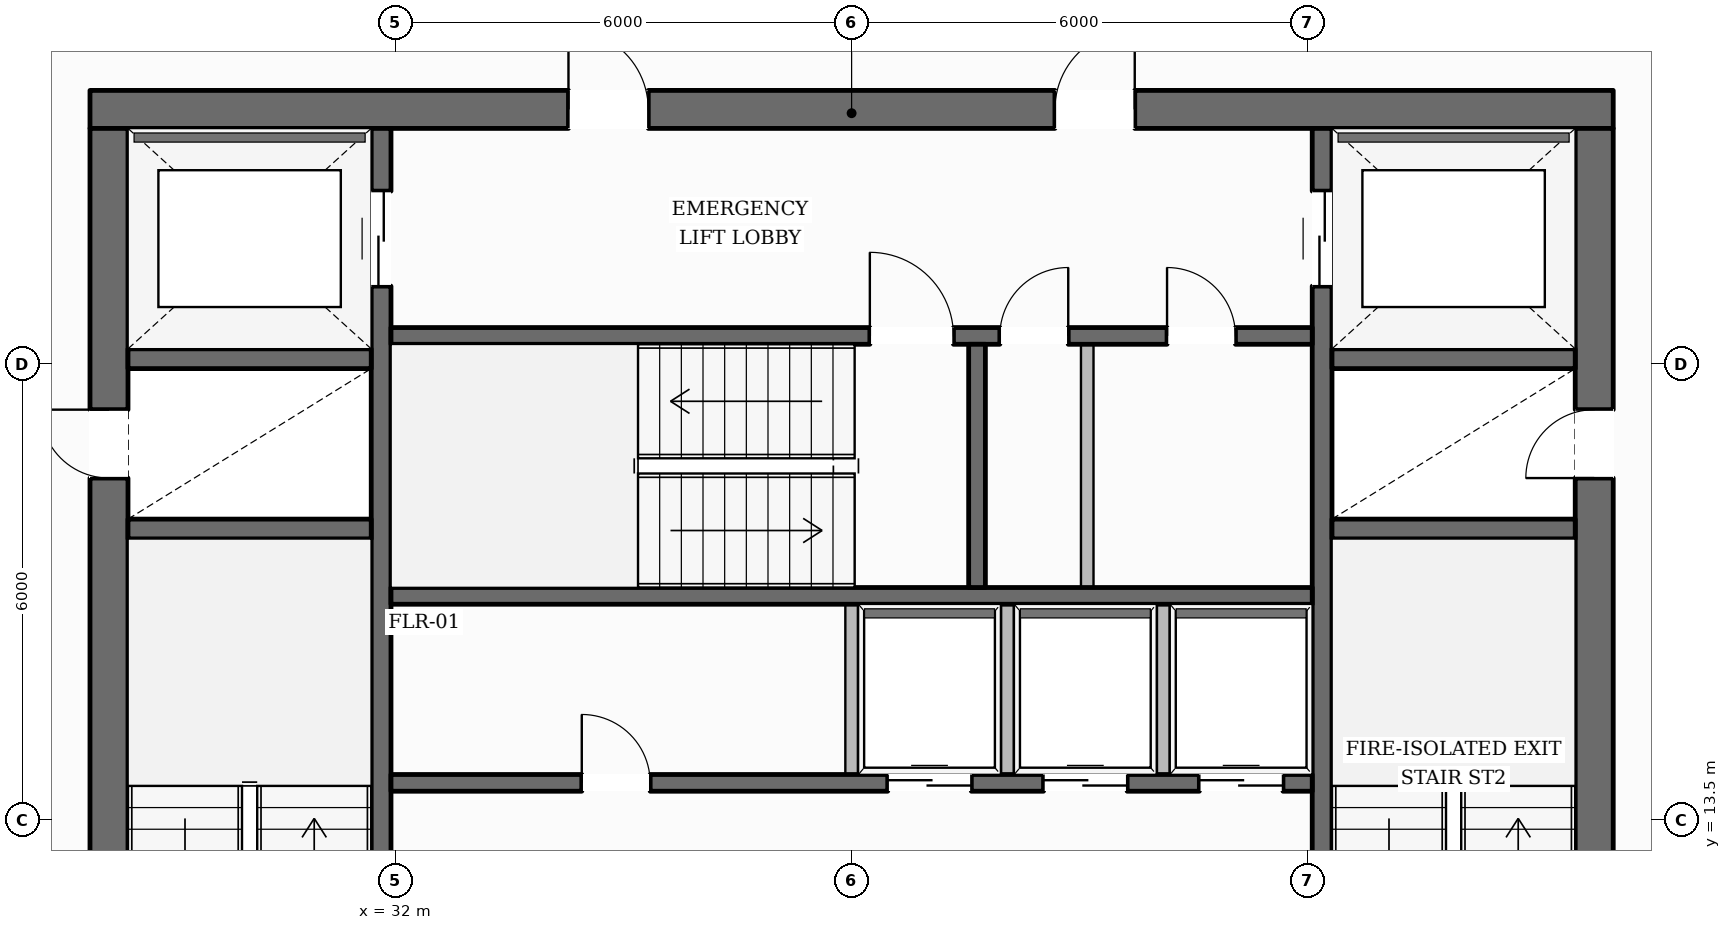
"""IFC4 building model, lengths in metres.
Left out: names, types, materials, properties, quantities, classifications, styles, units other than length and angle.
Written with IfcOpenShell. Run it as: python <this file> out.ifc"""

import sys

from ifc_helpers import new_model, si_unit, direction, frame, frame_2d, origin, place, context, subcontext, project, spatial, rectangle, extrude, element, fill, save


model = new_model("IFC4")
c1 = context("Model", 3, precision=1e-05, world=origin(), true_north=direction((0.0, 1.0)))
c2 = subcontext(c1, "Body", "Model", "MODEL_VIEW")
j1 = project(units=[si_unit("LENGTHUNIT", "METRE"), si_unit("PLANEANGLEUNIT", "RADIAN")], contexts=[c1])
p1 = place(None, origin())
s1 = spatial("IfcSite", under=j1, at=p1, CompositionType="ELEMENT")
p2 = place(p1, origin())
s2 = spatial("IfcBuilding", under=s1, at=p2, CompositionType="ELEMENT")
p3 = place(p2, frame((0.0, 0.0, 89.35)))
s3 = spatial("IfcBuildingStorey", under=s2, at=p3, CompositionType="ELEMENT", Elevation=89.35)
p4 = place(p3, frame((27.98, 22.85, 0.0), z_axis=(0.0, 0.0, 1.0), x_axis=(1.0, 0.0, 0.0)))
e1 = element("IfcWall", 1, at=p4, inside=s3, PredefinedType="SOLIDWALL", context=c2, shape_type="SweptSolid", body=[
    extrude(rectangle(XDim=20.04, YDim=0.5, at=frame_2d((10.02, 0.0))), origin(), (0.0, 0.0, 1.0), 3.6),
])
p5 = place(p4, frame((6.295, 0.0, 0.0)))
e2 = element("IfcOpeningElement", 2, at=p5, cuts=e1, PredefinedType="OPENING", context=c2, shape_type="SweptSolid", body=[
    extrude(rectangle(XDim=1.05, YDim=2.15, at=frame_2d((0.525, 1.075))), frame((0.0, 0.26, 0.0), z_axis=(0.0, -1.0, 0.0), x_axis=(1.0, 0.0, 0.0)), (0.0, 0.0, 1.0), 0.52),
])
p6 = place(p4, frame((12.695, 0.0, 0.0)))
e3 = element("IfcOpeningElement", 3, at=p6, cuts=e1, PredefinedType="OPENING", context=c2, shape_type="SweptSolid", body=[
    extrude(rectangle(XDim=1.05, YDim=2.15, at=frame_2d((0.525, 1.075))), frame((0.0, 0.26, 0.0), z_axis=(0.0, -1.0, 0.0), x_axis=(1.0, 0.0, 0.0)), (0.0, 0.0, 1.0), 0.52),
])
p7 = place(p3, frame((28.23, 9.6, 0.0), z_axis=(0.0, 0.0, 1.0), x_axis=(0.0, 1.0, 0.0)))
e4 = element("IfcWall", 4, at=p7, inside=s3, PredefinedType="SOLIDWALL", context=c2, shape_type="SweptSolid", body=[
    extrude(rectangle(XDim=13.0, YDim=0.5, at=frame_2d((6.5, 0.0))), origin(), (0.0, 0.0, 1.0), 3.6),
])
p8 = place(p7, frame((0.2, 0.0, 0.0)))
e5 = element("IfcOpeningElement", 5, at=p8, cuts=e4, PredefinedType="OPENING", context=c2, shape_type="SweptSolid", body=[
    extrude(rectangle(XDim=1.1, YDim=2.15, at=frame_2d((0.55, 1.075))), frame((0.0, 0.26, 0.0), z_axis=(0.0, -1.0, 0.0), x_axis=(1.0, 0.0, 0.0)), (0.0, 0.0, 1.0), 0.52),
])
p9 = place(p7, frame((8.4, 0.0, 0.0)))
e6 = element("IfcOpeningElement", 6, at=p9, cuts=e4, PredefinedType="OPENING", context=c2, shape_type="SweptSolid", body=[
    extrude(rectangle(XDim=0.9, YDim=2.1, at=frame_2d((0.45, 1.05))), frame((0.0, 0.26, 0.0), z_axis=(0.0, -1.0, 0.0), x_axis=(1.0, 0.0, 0.0)), (0.0, 0.0, 1.0), 0.52),
])
p10 = place(p3, frame((47.77, 9.6, 0.0), z_axis=(0.0, 0.0, 1.0), x_axis=(0.0, 1.0, 0.0)))
e7 = element("IfcWall", 7, at=p10, inside=s3, PredefinedType="SOLIDWALL", context=c2, shape_type="SweptSolid", body=[
    extrude(rectangle(XDim=13.0, YDim=0.5, at=frame_2d((6.5, 0.0))), origin(), (0.0, 0.0, 1.0), 3.6),
])
p11 = place(p10, frame((0.2, 0.0, 0.0)))
e8 = element("IfcOpeningElement", 8, at=p11, cuts=e7, PredefinedType="OPENING", context=c2, shape_type="SweptSolid", body=[
    extrude(rectangle(XDim=1.1, YDim=2.15, at=frame_2d((0.55, 1.075))), frame((0.0, 0.26, 0.0), z_axis=(0.0, -1.0, 0.0), x_axis=(1.0, 0.0, 0.0)), (0.0, 0.0, 1.0), 0.52),
])
p12 = place(p10, frame((8.4, 0.0, 0.0)))
e9 = element("IfcOpeningElement", 9, at=p12, cuts=e7, PredefinedType="OPENING", context=c2, shape_type="SweptSolid", body=[
    extrude(rectangle(XDim=0.9, YDim=2.1, at=frame_2d((0.45, 1.05))), frame((0.0, 0.26, 0.0), z_axis=(0.0, -1.0, 0.0), x_axis=(1.0, 0.0, 0.0)), (0.0, 0.0, 1.0), 0.52),
])
p13 = place(p3, frame((31.81, 9.6, 0.0), z_axis=(0.0, 0.0, 1.0), x_axis=(0.0, 1.0, 0.0)))
e10 = element("IfcWall", 10, at=p13, inside=s3, PredefinedType="SHEAR", context=c2, shape_type="SweptSolid", body=[
    extrude(rectangle(XDim=13.0, YDim=0.26, at=frame_2d((6.5, 0.0))), origin(), (0.0, 0.0, 1.0), 3.6),
])
p14 = place(p13, frame((10.925, 0.0, 0.0)))
e11 = element("IfcOpeningElement", 11, at=p14, cuts=e10, PredefinedType="OPENING", context=c2, shape_type="SweptSolid", body=[
    extrude(rectangle(XDim=1.25, YDim=2.25, at=frame_2d((0.625, 1.125))), frame((0.0, 0.14, 0.0), z_axis=(0.0, -1.0, 0.0), x_axis=(1.0, 0.0, 0.0)), (0.0, 0.0, 1.0), 0.28),
])
p15 = place(p3, frame((44.19, 9.6, 0.0), z_axis=(0.0, 0.0, 1.0), x_axis=(0.0, 1.0, 0.0)))
e12 = element("IfcWall", 12, at=p15, inside=s3, PredefinedType="SHEAR", context=c2, shape_type="SweptSolid", body=[
    extrude(rectangle(XDim=13.0, YDim=0.26, at=frame_2d((6.5, 0.0))), origin(), (0.0, 0.0, 1.0), 3.6),
])
p16 = place(p15, frame((10.925, 0.0, 0.0)))
e13 = element("IfcOpeningElement", 13, at=p16, cuts=e12, PredefinedType="OPENING", context=c2, shape_type="SweptSolid", body=[
    extrude(rectangle(XDim=1.25, YDim=2.25, at=frame_2d((0.625, 1.125))), frame((0.0, 0.14, 0.0), z_axis=(0.0, -1.0, 0.0), x_axis=(1.0, 0.0, 0.0)), (0.0, 0.0, 1.0), 0.28),
])
for number, where, z_axis, x_axis in (
    (14, (28.48, 17.33, 0.0), (0.0, 0.0, 1.0), (1.0, 0.0, 0.0)),
    (15, (28.48, 19.57, 0.0), (0.0, 0.0, 1.0), (1.0, 0.0, 0.0)),
    (16, (44.32, 17.33, 0.0), (0.0, 0.0, 1.0), (1.0, 0.0, 0.0)),
    (17, (44.32, 19.57, 0.0), (0.0, 0.0, 1.0), (1.0, 0.0, 0.0)),
):
    element("IfcWall", number, at=place(p3, frame(where, z_axis=z_axis, x_axis=x_axis)), inside=s3, PredefinedType="SHEAR", context=c2, shape_type="SweptSolid", body=[
        extrude(rectangle(XDim=3.2, YDim=0.26, at=frame_2d((1.6, 0.0))), origin(), (0.0, 0.0, 1.0), 3.6),
    ])
p17 = place(p3, frame((31.94, 19.87, 0.0), z_axis=(0.0, 0.0, 1.0), x_axis=(1.0, 0.0, 0.0)))
e18 = element("IfcWall", 18, at=p17, inside=s3, PredefinedType="SOLIDWALL", context=c2, shape_type="SweptSolid", body=[
    extrude(rectangle(XDim=12.12, YDim=0.22, at=frame_2d((6.06, 0.0))), origin(), (0.0, 0.0, 1.0), 3.6),
])
p18 = place(p17, frame((6.3, 0.0, 0.0)))
e19 = element("IfcOpeningElement", 19, at=p18, cuts=e18, PredefinedType="OPENING", context=c2, shape_type="SweptSolid", body=[
    extrude(rectangle(XDim=1.1, YDim=2.15, at=frame_2d((0.55, 1.075))), frame((0.0, 0.12, 0.0), z_axis=(0.0, -1.0, 0.0), x_axis=(1.0, 0.0, 0.0)), (0.0, 0.0, 1.0), 0.24),
])
p19 = place(p17, frame((8.01, 0.0, 0.0)))
e20 = element("IfcOpeningElement", 20, at=p19, cuts=e18, PredefinedType="OPENING", context=c2, shape_type="SweptSolid", body=[
    extrude(rectangle(XDim=0.9, YDim=2.1, at=frame_2d((0.45, 1.05))), frame((0.0, 0.12, 0.0), z_axis=(0.0, -1.0, 0.0), x_axis=(1.0, 0.0, 0.0)), (0.0, 0.0, 1.0), 0.24),
])
p20 = place(p17, frame((10.21, 0.0, 0.0)))
e21 = element("IfcOpeningElement", 21, at=p20, cuts=e18, PredefinedType="OPENING", context=c2, shape_type="SweptSolid", body=[
    extrude(rectangle(XDim=0.9, YDim=2.1, at=frame_2d((0.45, 1.05))), frame((0.0, 0.12, 0.0), z_axis=(0.0, -1.0, 0.0), x_axis=(1.0, 0.0, 0.0)), (0.0, 0.0, 1.0), 0.24),
])
p21 = place(p3, frame((31.94, 16.45, 0.0), z_axis=(0.0, 0.0, 1.0), x_axis=(1.0, 0.0, 0.0)))
e22 = element("IfcWall", 22, at=p21, inside=s3, PredefinedType="SOLIDWALL", context=c2, shape_type="SweptSolid", body=[
    extrude(rectangle(XDim=12.12, YDim=0.22, at=frame_2d((6.06, 0.0))), origin(), (0.0, 0.0, 1.0), 3.6),
])
p22 = place(p3, frame((39.65, 16.56, 0.0), z_axis=(0.0, 0.0, 1.0), x_axis=(0.0, 1.0, 0.0)))
e23 = element("IfcWall", 23, at=p22, inside=s3, PredefinedType="SOLIDWALL", context=c2, shape_type="SweptSolid", body=[
    extrude(rectangle(XDim=3.2, YDim=0.22, at=frame_2d((1.6, 0.0))), origin(), (0.0, 0.0, 1.0), 3.6),
])
p23 = place(p3, frame((31.94, 13.99, 0.0), z_axis=(0.0, 0.0, 1.0), x_axis=(1.0, 0.0, 0.0)))
e24 = element("IfcWall", 24, at=p23, inside=s3, PredefinedType="SOLIDWALL", context=c2, shape_type="SweptSolid", body=[
    extrude(rectangle(XDim=12.12, YDim=0.22, at=frame_2d((6.06, 0.0))), origin(), (0.0, 0.0, 1.0), 3.6),
])
p24 = place(p23, frame((2.51, 0.0, 0.0)))
e25 = element("IfcOpeningElement", 25, at=p24, cuts=e24, PredefinedType="OPENING", context=c2, shape_type="SweptSolid", body=[
    extrude(rectangle(XDim=0.9, YDim=2.1, at=frame_2d((0.45, 1.05))), frame((0.0, 0.12, 0.0), z_axis=(0.0, -1.0, 0.0), x_axis=(1.0, 0.0, 0.0)), (0.0, 0.0, 1.0), 0.24),
])
p25 = place(p23, frame((6.535, 0.0, 0.0)))
e26 = element("IfcOpeningElement", 26, at=p25, cuts=e24, PredefinedType="OPENING", context=c2, shape_type="SweptSolid", body=[
    extrude(rectangle(XDim=1.1, YDim=2.2, at=frame_2d((0.55, 1.1))), frame((0.0, 0.12, 0.0), z_axis=(0.0, -1.0, 0.0), x_axis=(1.0, 0.0, 0.0)), (0.0, 0.0, 1.0), 0.24),
])
p26 = place(p23, frame((8.585, 0.0, 0.0)))
e27 = element("IfcOpeningElement", 27, at=p26, cuts=e24, PredefinedType="OPENING", context=c2, shape_type="SweptSolid", body=[
    extrude(rectangle(XDim=1.1, YDim=2.2, at=frame_2d((0.55, 1.1))), frame((0.0, 0.12, 0.0), z_axis=(0.0, -1.0, 0.0), x_axis=(1.0, 0.0, 0.0)), (0.0, 0.0, 1.0), 0.24),
])
p27 = place(p23, frame((10.635, 0.0, 0.0)))
e28 = element("IfcOpeningElement", 28, at=p27, cuts=e24, PredefinedType="OPENING", context=c2, shape_type="SweptSolid", body=[
    extrude(rectangle(XDim=1.1, YDim=2.2, at=frame_2d((0.55, 1.1))), frame((0.0, 0.12, 0.0), z_axis=(0.0, -1.0, 0.0), x_axis=(1.0, 0.0, 0.0)), (0.0, 0.0, 1.0), 0.24),
])
p28 = place(p3, frame((13.926, 13.506, 0.0), z_axis=(0.0, 0.0, 1.0), x_axis=(0.496286611319, 0.868158740914, 0.0)))
e29 = element("IfcWall", 29, at=p28, inside=s3, PredefinedType="STANDARD", context=c2, shape_type="SweptSolid", body=[
    extrude(rectangle(XDim=35.785, YDim=0.38, at=frame_2d((17.893, 0.0))), origin(), (0.0, 0.0, 1.0), 3.059),
])
p29 = place(p28, frame((31.63, 0.0, 0.65)))
e30 = element("IfcOpeningElement", 30, at=p29, cuts=e29, PredefinedType="OPENING", context=c2, shape_type="SweptSolid", body=[
    extrude(rectangle(XDim=1.55, YDim=1.75, at=frame_2d((0.775, 0.875))), frame((0.0, 0.2, 0.0), z_axis=(0.0, -1.0, 0.0), x_axis=(1.0, 0.0, 0.0)), (0.0, 0.0, 1.0), 0.4),
])
p30 = place(p28, frame((25.824, 0.0, 0.65)))
e31 = element("IfcOpeningElement", 31, at=p30, cuts=e29, PredefinedType="OPENING", context=c2, shape_type="SweptSolid", body=[
    extrude(rectangle(XDim=1.55, YDim=1.75, at=frame_2d((0.775, 0.875))), frame((0.0, 0.2, 0.0), z_axis=(0.0, -1.0, 0.0), x_axis=(1.0, 0.0, 0.0)), (0.0, 0.0, 1.0), 0.4),
])
p31 = place(p28, frame((20.018, 0.0, 0.65)))
e32 = element("IfcOpeningElement", 32, at=p31, cuts=e29, PredefinedType="OPENING", context=c2, shape_type="SweptSolid", body=[
    extrude(rectangle(XDim=1.55, YDim=1.75, at=frame_2d((0.775, 0.875))), frame((0.0, 0.2, 0.0), z_axis=(0.0, -1.0, 0.0), x_axis=(1.0, 0.0, 0.0)), (0.0, 0.0, 1.0), 0.4),
])
p32 = place(p28, frame((8.407, 0.0, 0.65)))
e33 = element("IfcOpeningElement", 33, at=p32, cuts=e29, PredefinedType="OPENING", context=c2, shape_type="SweptSolid", body=[
    extrude(rectangle(XDim=1.55, YDim=1.75, at=frame_2d((0.775, 0.875))), frame((0.0, 0.2, 0.0), z_axis=(0.0, -1.0, 0.0), x_axis=(1.0, 0.0, 0.0)), (0.0, 0.0, 1.0), 0.4),
])
p33 = place(p28, frame((2.601, 0.0, 0.65)))
e34 = element("IfcOpeningElement", 34, at=p33, cuts=e29, PredefinedType="OPENING", context=c2, shape_type="SweptSolid", body=[
    extrude(rectangle(XDim=1.55, YDim=1.75, at=frame_2d((0.775, 0.875))), frame((0.0, 0.2, 0.0), z_axis=(0.0, -1.0, 0.0), x_axis=(1.0, 0.0, 0.0)), (0.0, 0.0, 1.0), 0.4),
])
p34 = place(p3, frame((44.253, 44.609, 0.0), z_axis=(0.0, 0.0, 1.0), x_axis=(0.493917790196, -0.869508606356, 0.0)))
e35 = element("IfcWall", 35, at=p34, inside=s3, PredefinedType="STANDARD", context=c2, shape_type="SweptSolid", body=[
    extrude(rectangle(XDim=35.62, YDim=0.38, at=frame_2d((17.81, 0.0))), origin(), (0.0, 0.0, 1.0), 3.059),
])
p35 = place(p34, frame((8.505, 0.0, 0.0)))
e36 = element("IfcOpeningElement", 36, at=p35, cuts=e35, PredefinedType="OPENING", context=c2, shape_type="SweptSolid", body=[
    extrude(rectangle(XDim=1.0, YDim=2.2, at=frame_2d((0.5, 1.1))), frame((0.0, 0.2, 0.0), z_axis=(0.0, -1.0, 0.0), x_axis=(1.0, 0.0, 0.0)), (0.0, 0.0, 1.0), 0.4),
])
p36 = place(p34, frame((31.483, 0.0, 0.65)))
e37 = element("IfcOpeningElement", 37, at=p36, cuts=e35, PredefinedType="OPENING", context=c2, shape_type="SweptSolid", body=[
    extrude(rectangle(XDim=1.55, YDim=1.75, at=frame_2d((0.775, 0.875))), frame((0.0, 0.2, 0.0), z_axis=(0.0, -1.0, 0.0), x_axis=(1.0, 0.0, 0.0)), (0.0, 0.0, 1.0), 0.4),
])
p37 = place(p34, frame((25.705, 0.0, 0.65)))
e38 = element("IfcOpeningElement", 38, at=p37, cuts=e35, PredefinedType="OPENING", context=c2, shape_type="SweptSolid", body=[
    extrude(rectangle(XDim=1.55, YDim=1.75, at=frame_2d((0.775, 0.875))), frame((0.0, 0.2, 0.0), z_axis=(0.0, -1.0, 0.0), x_axis=(1.0, 0.0, 0.0)), (0.0, 0.0, 1.0), 0.4),
])
p38 = place(p34, frame((19.927, 0.0, 0.65)))
e39 = element("IfcOpeningElement", 39, at=p38, cuts=e35, PredefinedType="OPENING", context=c2, shape_type="SweptSolid", body=[
    extrude(rectangle(XDim=1.55, YDim=1.75, at=frame_2d((0.775, 0.875))), frame((0.0, 0.2, 0.0), z_axis=(0.0, -1.0, 0.0), x_axis=(1.0, 0.0, 0.0)), (0.0, 0.0, 1.0), 0.4),
])
p39 = place(p34, frame((2.594, 0.0, 0.65)))
e40 = element("IfcOpeningElement", 40, at=p39, cuts=e35, PredefinedType="OPENING", context=c2, shape_type="SweptSolid", body=[
    extrude(rectangle(XDim=1.55, YDim=1.75, at=frame_2d((0.775, 0.875))), frame((0.0, 0.2, 0.0), z_axis=(0.0, -1.0, 0.0), x_axis=(1.0, 0.0, 0.0)), (0.0, 0.0, 1.0), 0.4),
])
for number, where, z_axis, x_axis in (
    (41, (38.0, 14.1, 0.0), (0.0, 0.0, 1.0), (0.0, 1.0, 0.0)),
    (42, (40.05, 14.1, 0.0), (0.0, 0.0, 1.0), (0.0, 1.0, 0.0)),
    (43, (42.1, 14.1, 0.0), (0.0, 0.0, 1.0), (0.0, 1.0, 0.0)),
):
    element("IfcWall", number, at=place(p3, frame(where, z_axis=z_axis, x_axis=x_axis)), inside=s3, PredefinedType="PARTITIONING", context=c2, shape_type="SweptSolid", body=[
        extrude(rectangle(XDim=2.24, YDim=0.165, at=frame_2d((1.12, 0.0))), origin(), (0.0, 0.0, 1.0), 3.6),
    ])
p40 = place(p3, frame((41.1, 16.56, 0.0), z_axis=(0.0, 0.0, 1.0), x_axis=(0.0, 1.0, 0.0)))
e44 = element("IfcWall", 44, at=p40, inside=s3, PredefinedType="PARTITIONING", context=c2, shape_type="SweptSolid", body=[
    extrude(rectangle(XDim=3.2, YDim=0.165, at=frame_2d((1.6, 0.0))), origin(), (0.0, 0.0, 1.0), 3.6),
])
p41 = place(p18, origin())
e45 = element("IfcDoor", 45, at=p41, inside=s3, OperationType="SINGLE_SWING_LEFT", PredefinedType="DOOR", context=c2, shape_type="SweptSolid", body=[
    extrude(rectangle(XDim=1.1, YDim=2.15, at=frame_2d((0.55, 1.075))), frame((0.0, 0.025, 0.0), z_axis=(0.0, -1.0, 0.0), x_axis=(1.0, 0.0, 0.0)), (0.0, 0.0, 1.0), 0.05),
])
fill(e19, e45)
p42 = place(p9, origin())
e46 = element("IfcDoor", 46, at=p42, inside=s3, OperationType="SINGLE_SWING_RIGHT", PredefinedType="DOOR", context=c2, shape_type="SweptSolid", body=[
    extrude(rectangle(XDim=0.9, YDim=2.1, at=frame_2d((0.45, 1.05))), frame((0.0, 0.025, 0.0), z_axis=(0.0, -1.0, 0.0), x_axis=(1.0, 0.0, 0.0)), (0.0, 0.0, 1.0), 0.05),
])
fill(e6, e46)
p43 = place(p12, origin())
e47 = element("IfcDoor", 47, at=p43, inside=s3, OperationType="SINGLE_SWING_LEFT", PredefinedType="DOOR", context=c2, shape_type="SweptSolid", body=[
    extrude(rectangle(XDim=0.9, YDim=2.1, at=frame_2d((0.45, 1.05))), frame((0.0, 0.025, 0.0), z_axis=(0.0, -1.0, 0.0), x_axis=(1.0, 0.0, 0.0)), (0.0, 0.0, 1.0), 0.05),
])
fill(e9, e47)
p44 = place(p5, origin())
e48 = element("IfcDoor", 48, at=p44, inside=s3, OperationType="SINGLE_SWING_LEFT", PredefinedType="DOOR", context=c2, shape_type="SweptSolid", body=[
    extrude(rectangle(XDim=1.05, YDim=2.15, at=frame_2d((0.525, 1.075))), frame((0.0, 0.025, 0.0), z_axis=(0.0, -1.0, 0.0), x_axis=(1.0, 0.0, 0.0)), (0.0, 0.0, 1.0), 0.05),
])
fill(e2, e48)
p45 = place(p6, origin())
e49 = element("IfcDoor", 49, at=p45, inside=s3, OperationType="SINGLE_SWING_RIGHT", PredefinedType="DOOR", context=c2, shape_type="SweptSolid", body=[
    extrude(rectangle(XDim=1.05, YDim=2.15, at=frame_2d((0.525, 1.075))), frame((0.0, 0.025, 0.0), z_axis=(0.0, -1.0, 0.0), x_axis=(1.0, 0.0, 0.0)), (0.0, 0.0, 1.0), 0.05),
])
fill(e3, e49)
p46 = place(p14, origin())
e50 = element("IfcDoor", 50, at=p46, inside=s3, OperationType="DOUBLE_DOOR_SLIDING", PredefinedType="DOOR", context=c2, shape_type="SweptSolid", body=[
    extrude(rectangle(XDim=1.25, YDim=2.25, at=frame_2d((0.625, 1.125))), frame((0.0, 0.025, 0.0), z_axis=(0.0, -1.0, 0.0), x_axis=(1.0, 0.0, 0.0)), (0.0, 0.0, 1.0), 0.05),
])
fill(e11, e50)
p47 = place(p16, origin())
e51 = element("IfcDoor", 51, at=p47, inside=s3, OperationType="DOUBLE_DOOR_SLIDING", PredefinedType="DOOR", context=c2, shape_type="SweptSolid", body=[
    extrude(rectangle(XDim=1.25, YDim=2.25, at=frame_2d((0.625, 1.125))), frame((0.0, 0.025, 0.0), z_axis=(0.0, -1.0, 0.0), x_axis=(1.0, 0.0, 0.0)), (0.0, 0.0, 1.0), 0.05),
])
fill(e13, e51)
p48 = place(p24, origin())
e52 = element("IfcDoor", 52, at=p48, inside=s3, OperationType="SINGLE_SWING_LEFT", PredefinedType="DOOR", context=c2, shape_type="SweptSolid", body=[
    extrude(rectangle(XDim=0.9, YDim=2.1, at=frame_2d((0.45, 1.05))), frame((0.0, 0.025, 0.0), z_axis=(0.0, -1.0, 0.0), x_axis=(1.0, 0.0, 0.0)), (0.0, 0.0, 1.0), 0.05),
])
fill(e25, e52)
p49 = place(p25, origin())
e53 = element("IfcDoor", 53, at=p49, inside=s3, OperationType="DOUBLE_DOOR_SLIDING", PredefinedType="DOOR", context=c2, shape_type="SweptSolid", body=[
    extrude(rectangle(XDim=1.1, YDim=2.2, at=frame_2d((0.55, 1.1))), frame((0.0, 0.025, 0.0), z_axis=(0.0, -1.0, 0.0), x_axis=(1.0, 0.0, 0.0)), (0.0, 0.0, 1.0), 0.05),
])
fill(e26, e53)
p50 = place(p26, origin())
e54 = element("IfcDoor", 54, at=p50, inside=s3, OperationType="DOUBLE_DOOR_SLIDING", PredefinedType="DOOR", context=c2, shape_type="SweptSolid", body=[
    extrude(rectangle(XDim=1.1, YDim=2.2, at=frame_2d((0.55, 1.1))), frame((0.0, 0.025, 0.0), z_axis=(0.0, -1.0, 0.0), x_axis=(1.0, 0.0, 0.0)), (0.0, 0.0, 1.0), 0.05),
])
fill(e27, e54)
p51 = place(p27, origin())
e55 = element("IfcDoor", 55, at=p51, inside=s3, OperationType="DOUBLE_DOOR_SLIDING", PredefinedType="DOOR", context=c2, shape_type="SweptSolid", body=[
    extrude(rectangle(XDim=1.1, YDim=2.2, at=frame_2d((0.55, 1.1))), frame((0.0, 0.025, 0.0), z_axis=(0.0, -1.0, 0.0), x_axis=(1.0, 0.0, 0.0)), (0.0, 0.0, 1.0), 0.05),
])
fill(e28, e55)
p52 = place(p19, origin())
e56 = element("IfcDoor", 56, at=p52, inside=s3, OperationType="SINGLE_SWING_RIGHT", PredefinedType="DOOR", context=c2, shape_type="SweptSolid", body=[
    extrude(rectangle(XDim=0.9, YDim=2.1, at=frame_2d((0.45, 1.05))), frame((0.0, 0.025, 0.0), z_axis=(0.0, -1.0, 0.0), x_axis=(1.0, 0.0, 0.0)), (0.0, 0.0, 1.0), 0.05),
])
fill(e20, e56)
p53 = place(p20, origin())
e57 = element("IfcDoor", 57, at=p53, inside=s3, OperationType="SINGLE_SWING_LEFT", PredefinedType="DOOR", context=c2, shape_type="SweptSolid", body=[
    extrude(rectangle(XDim=0.9, YDim=2.1, at=frame_2d((0.45, 1.05))), frame((0.0, 0.025, 0.0), z_axis=(0.0, -1.0, 0.0), x_axis=(1.0, 0.0, 0.0)), (0.0, 0.0, 1.0), 0.05),
])
fill(e21, e57)
save(model, sys.argv[1])
